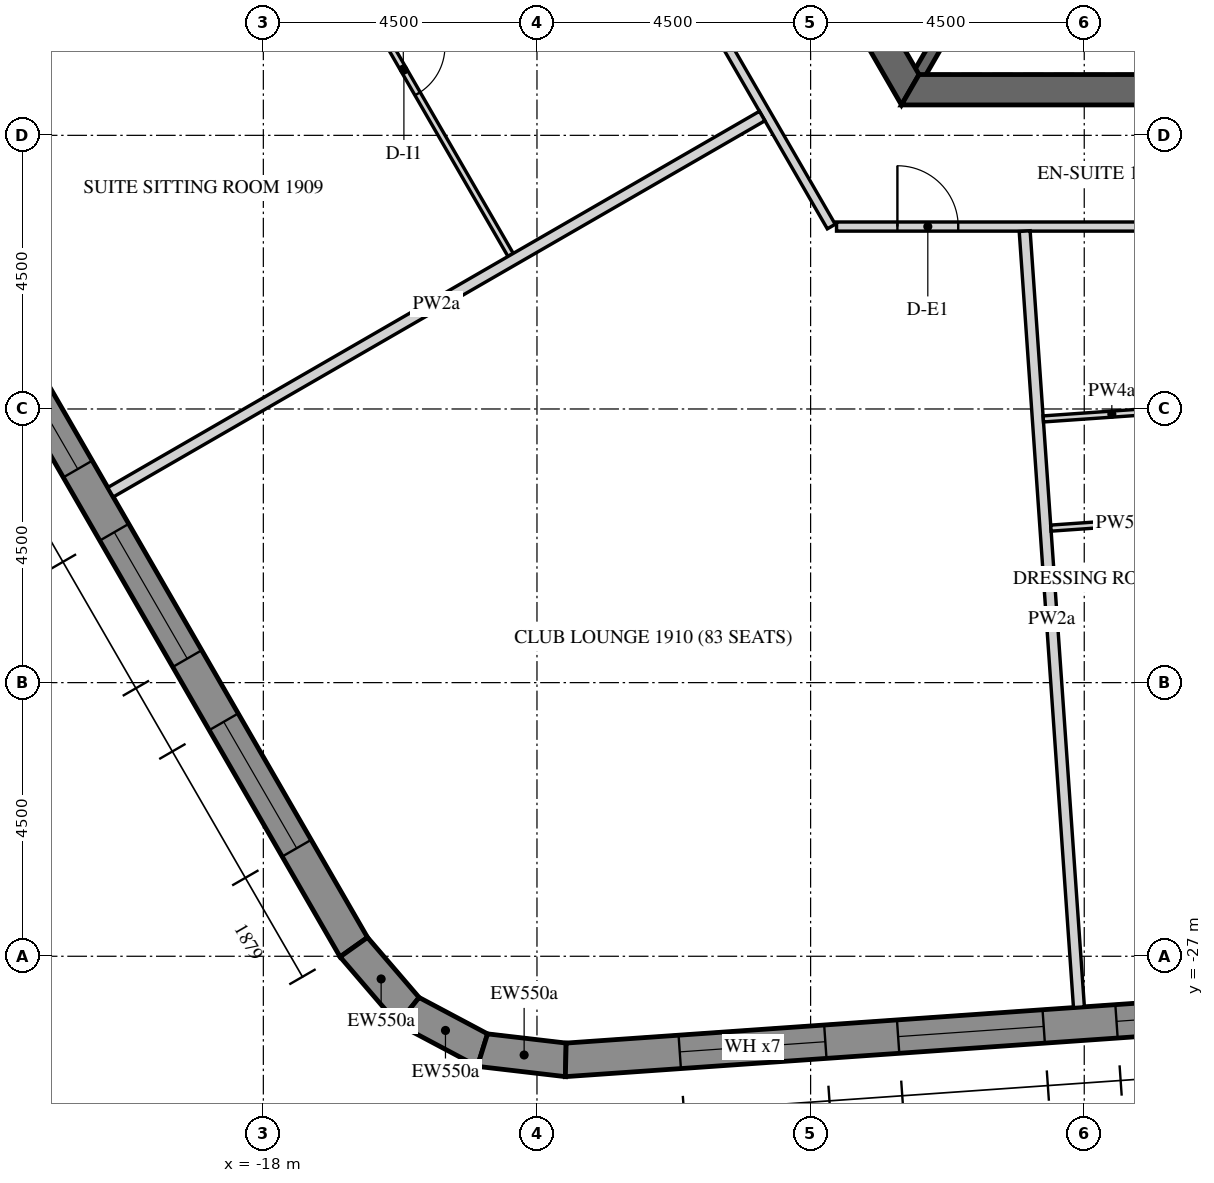
"""IFC4 building model, lengths in metres.
Left out: names, types, materials, properties, quantities, classifications, styles, units other than length and angle.
Written with IfcOpenShell. Run it as: python <this file> out.ifc"""

import sys

from ifc_helpers import new_model, si_unit, direction, frame, frame_2d, origin, place, context, subcontext, project, spatial, polyline, rectangle, outline, extrude, element, fill, save


model = new_model("IFC4")
c1 = context("Model", 3, precision=1e-05, world=origin(), true_north=direction((0.0, 1.0)))
c2 = subcontext(c1, "Body", "Model", "MODEL_VIEW")
j1 = project(units=[si_unit("LENGTHUNIT", "METRE"), si_unit("PLANEANGLEUNIT", "RADIAN")], contexts=[c1])
p1 = place(None, origin())
s1 = spatial("IfcSite", under=j1, at=p1, CompositionType="ELEMENT")
p2 = place(p1, origin())
s2 = spatial("IfcBuilding", under=s1, at=p2, CompositionType="ELEMENT")
p3 = place(p2, frame((0.0, 0.0, 246.3)))
s3 = spatial("IfcBuildingStorey", under=s2, at=p3, CompositionType="ELEMENT", Elevation=246.3)
p4 = place(p3, frame((-30.391, -2.811, -0.15), z_axis=(0.0, 0.0, 1.0), x_axis=(0.499998569178, -0.866026229868, 0.0)))
e1 = element("IfcWall", 1, at=p4, inside=s3, PredefinedType="SOLIDWALL", context=c2, shape_type="SweptSolid", body=[
    extrude(outline(polyline([(-0.022, -0.275), (27.783, -0.275), (27.732, 0.275), (0.022, 0.275), (-0.022, -0.275)])), origin(), (0.0, 0.0, 1.0), 3.75),
])
p5 = place(p4, frame((1.879, 0.0, 1.05)))
e2 = element("IfcOpeningElement", 2, at=p5, cuts=e1, PredefinedType="OPENING", context=c2, shape_type="SweptSolid", body=[
    extrude(rectangle(XDim=2.4, YDim=2.4, at=frame_2d((1.2, 1.2))), frame((0.0, 0.285, 0.0), z_axis=(0.0, -1.0, 0.0), x_axis=(1.0, 0.0, 0.0)), (0.0, 0.0, 1.0), 0.57),
])
p6 = place(p4, frame((5.479, 0.0, 1.05)))
e3 = element("IfcOpeningElement", 3, at=p6, cuts=e1, PredefinedType="OPENING", context=c2, shape_type="SweptSolid", body=[
    extrude(rectangle(XDim=2.4, YDim=2.4, at=frame_2d((1.2, 1.2))), frame((0.0, 0.285, 0.0), z_axis=(0.0, -1.0, 0.0), x_axis=(1.0, 0.0, 0.0)), (0.0, 0.0, 1.0), 0.57),
])
p7 = place(p4, frame((9.079, 0.0, 1.05)))
e4 = element("IfcOpeningElement", 4, at=p7, cuts=e1, PredefinedType="OPENING", context=c2, shape_type="SweptSolid", body=[
    extrude(rectangle(XDim=2.4, YDim=2.4, at=frame_2d((1.2, 1.2))), frame((0.0, 0.285, 0.0), z_axis=(0.0, -1.0, 0.0), x_axis=(1.0, 0.0, 0.0)), (0.0, 0.0, 1.0), 0.57),
])
p8 = place(p4, frame((12.679, 0.0, 1.05)))
e5 = element("IfcOpeningElement", 5, at=p8, cuts=e1, PredefinedType="OPENING", context=c2, shape_type="SweptSolid", body=[
    extrude(rectangle(XDim=2.4, YDim=2.4, at=frame_2d((1.2, 1.2))), frame((0.0, 0.285, 0.0), z_axis=(0.0, -1.0, 0.0), x_axis=(1.0, 0.0, 0.0)), (0.0, 0.0, 1.0), 0.57),
])
p9 = place(p4, frame((16.279, 0.0, 1.05)))
e6 = element("IfcOpeningElement", 6, at=p9, cuts=e1, PredefinedType="OPENING", context=c2, shape_type="SweptSolid", body=[
    extrude(rectangle(XDim=2.4, YDim=2.4, at=frame_2d((1.2, 1.2))), frame((0.0, 0.285, 0.0), z_axis=(0.0, -1.0, 0.0), x_axis=(1.0, 0.0, 0.0)), (0.0, 0.0, 1.0), 0.57),
])
p10 = place(p4, frame((19.879, 0.0, 1.05)))
e7 = element("IfcOpeningElement", 7, at=p10, cuts=e1, PredefinedType="OPENING", context=c2, shape_type="SweptSolid", body=[
    extrude(rectangle(XDim=2.4, YDim=2.4, at=frame_2d((1.2, 1.2))), frame((0.0, 0.285, 0.0), z_axis=(0.0, -1.0, 0.0), x_axis=(1.0, 0.0, 0.0)), (0.0, 0.0, 1.0), 0.57),
])
p11 = place(p4, frame((23.479, 0.0, 1.05)))
e8 = element("IfcOpeningElement", 8, at=p11, cuts=e1, PredefinedType="OPENING", context=c2, shape_type="SweptSolid", body=[
    extrude(rectangle(XDim=2.4, YDim=2.4, at=frame_2d((1.2, 1.2))), frame((0.0, 0.285, 0.0), z_axis=(0.0, -1.0, 0.0), x_axis=(1.0, 0.0, 0.0)), (0.0, 0.0, 1.0), 0.57),
])
p12 = place(p3, frame((-16.512, -26.85, -0.15), z_axis=(0.0, 0.0, 1.0), x_axis=(0.651621950847, -0.758543890078, 0.0)))
e9 = element("IfcWall", 9, at=p12, inside=s3, PredefinedType="SOLIDWALL", context=c2, shape_type="SweptSolid", body=[
    extrude(outline(polyline([(-0.026, -0.275), (1.431, -0.275), (1.327, 0.275), (0.026, 0.275), (-0.026, -0.275)])), origin(), (0.0, 0.0, 1.0), 3.75),
])
p13 = place(p3, frame((-15.614, -27.896, -0.15), z_axis=(0.0, 0.0, 1.0), x_axis=(0.882994189209, -0.469383917304, 0.0)))
e10 = element("IfcWall", 10, at=p13, inside=s3, PredefinedType="SOLIDWALL", context=c2, shape_type="SweptSolid", body=[
    extrude(outline(polyline([(-0.052, -0.275), (1.431, -0.275), (1.327, 0.275), (0.052, 0.275), (-0.052, -0.275)])), origin(), (0.0, 0.0, 1.0), 3.75),
])
p14 = place(p3, frame((-14.396, -28.543, -0.15), z_axis=(0.0, 0.0, 1.0), x_axis=(0.993232537394, -0.11614269956, 0.0)))
e11 = element("IfcWall", 11, at=p14, inside=s3, PredefinedType="SOLIDWALL", context=c2, shape_type="SweptSolid", body=[
    extrude(outline(polyline([(-0.052, -0.275), (1.405, -0.275), (1.353, 0.275), (0.052, 0.275), (-0.052, -0.275)])), origin(), (0.0, 0.0, 1.0), 3.75),
])
p15 = place(p3, frame((-13.026, -28.704, -0.15), z_axis=(0.0, 0.0, 1.0), x_axis=(0.99756406806, 0.069756219185, 0.0)))
e12 = element("IfcWall", 12, at=p15, inside=s3, PredefinedType="SOLIDWALL", context=c2, shape_type="SweptSolid", body=[
    extrude(outline(polyline([(-0.026, -0.275), (27.78, -0.275), (27.735, 0.275), (0.026, 0.275), (-0.026, -0.275)])), origin(), (0.0, 0.0, 1.0), 3.75),
])
p16 = place(p15, frame((1.879, 0.0, 1.05)))
e13 = element("IfcOpeningElement", 13, at=p16, cuts=e12, PredefinedType="OPENING", context=c2, shape_type="SweptSolid", body=[
    extrude(rectangle(XDim=2.4, YDim=2.4, at=frame_2d((1.2, 1.2))), frame((0.0, 0.285, 0.0), z_axis=(0.0, -1.0, 0.0), x_axis=(1.0, 0.0, 0.0)), (0.0, 0.0, 1.0), 0.57),
])
p17 = place(p15, frame((5.479, 0.0, 1.05)))
e14 = element("IfcOpeningElement", 14, at=p17, cuts=e12, PredefinedType="OPENING", context=c2, shape_type="SweptSolid", body=[
    extrude(rectangle(XDim=2.4, YDim=2.4, at=frame_2d((1.2, 1.2))), frame((0.0, 0.285, 0.0), z_axis=(0.0, -1.0, 0.0), x_axis=(1.0, 0.0, 0.0)), (0.0, 0.0, 1.0), 0.57),
])
p18 = place(p15, frame((9.079, 0.0, 1.05)))
e15 = element("IfcOpeningElement", 15, at=p18, cuts=e12, PredefinedType="OPENING", context=c2, shape_type="SweptSolid", body=[
    extrude(rectangle(XDim=2.4, YDim=2.4, at=frame_2d((1.2, 1.2))), frame((0.0, 0.285, 0.0), z_axis=(0.0, -1.0, 0.0), x_axis=(1.0, 0.0, 0.0)), (0.0, 0.0, 1.0), 0.57),
])
p19 = place(p15, frame((12.679, 0.0, 1.05)))
e16 = element("IfcOpeningElement", 16, at=p19, cuts=e12, PredefinedType="OPENING", context=c2, shape_type="SweptSolid", body=[
    extrude(rectangle(XDim=2.4, YDim=2.4, at=frame_2d((1.2, 1.2))), frame((0.0, 0.285, 0.0), z_axis=(0.0, -1.0, 0.0), x_axis=(1.0, 0.0, 0.0)), (0.0, 0.0, 1.0), 0.57),
])
p20 = place(p15, frame((16.279, 0.0, 1.05)))
e17 = element("IfcOpeningElement", 17, at=p20, cuts=e12, PredefinedType="OPENING", context=c2, shape_type="SweptSolid", body=[
    extrude(rectangle(XDim=2.4, YDim=2.4, at=frame_2d((1.2, 1.2))), frame((0.0, 0.285, 0.0), z_axis=(0.0, -1.0, 0.0), x_axis=(1.0, 0.0, 0.0)), (0.0, 0.0, 1.0), 0.57),
])
p21 = place(p15, frame((19.879, 0.0, 1.05)))
e18 = element("IfcOpeningElement", 18, at=p21, cuts=e12, PredefinedType="OPENING", context=c2, shape_type="SweptSolid", body=[
    extrude(rectangle(XDim=2.4, YDim=2.4, at=frame_2d((1.2, 1.2))), frame((0.0, 0.285, 0.0), z_axis=(0.0, -1.0, 0.0), x_axis=(1.0, 0.0, 0.0)), (0.0, 0.0, 1.0), 0.57),
])
p22 = place(p15, frame((23.479, 0.0, 1.05)))
e19 = element("IfcOpeningElement", 19, at=p22, cuts=e12, PredefinedType="OPENING", context=c2, shape_type="SweptSolid", body=[
    extrude(rectangle(XDim=2.4, YDim=2.4, at=frame_2d((1.2, 1.2))), frame((0.0, 0.285, 0.0), z_axis=(0.0, -1.0, 0.0), x_axis=(1.0, 0.0, 0.0)), (0.0, 0.0, 1.0), 0.57),
])
p23 = place(p3, frame((-14.722, 0.0, -0.15), z_axis=(0.0, 0.0, 1.0), x_axis=(0.50000571537, -0.866022103989, 0.0)))
e20 = element("IfcWall", 20, at=p23, inside=s3, PredefinedType="SHEAR", context=c2, shape_type="SweptSolid", body=[
    extrude(outline(polyline([(-0.144, -0.25), (14.867, -0.25), (14.578, 0.25), (0.144, 0.25), (-0.144, -0.25)])), origin(), (0.0, 0.0, 1.0), 3.75),
])
p24 = place(p23, frame((6.432, 0.0, 0.15)))
e21 = element("IfcOpeningElement", 21, at=p24, cuts=e20, PredefinedType="OPENING", context=c2, shape_type="SweptSolid", body=[
    extrude(rectangle(XDim=1.8, YDim=2.4, at=frame_2d((0.9, 1.2))), frame((0.0, 0.26, 0.0), z_axis=(0.0, -1.0, 0.0), x_axis=(1.0, 0.0, 0.0)), (0.0, 0.0, 1.0), 0.52),
])
p25 = place(p3, frame((-7.361, -12.75, -0.15), z_axis=(0.0, 0.0, 1.0), x_axis=(1.0, 0.0, 0.0)))
e22 = element("IfcWall", 22, at=p25, inside=s3, PredefinedType="SHEAR", context=c2, shape_type="SweptSolid", body=[
    extrude(outline(polyline([(-0.144, -0.25), (14.866, -0.25), (14.578, 0.25), (0.144, 0.25), (-0.144, -0.25)])), origin(), (0.0, 0.0, 1.0), 3.75),
])
p26 = place(p25, frame((6.761, 0.0, 0.15)))
e23 = element("IfcOpeningElement", 23, at=p26, cuts=e22, PredefinedType="OPENING", context=c2, shape_type="SweptSolid", body=[
    extrude(rectangle(XDim=1.2, YDim=2.4, at=frame_2d((0.6, 1.2))), frame((0.0, 0.26, 0.0), z_axis=(0.0, -1.0, 0.0), x_axis=(1.0, 0.0, 0.0)), (0.0, 0.0, 1.0), 0.52),
])
p27 = place(p3, frame((-5.773, -10.0, -0.15), z_axis=(0.0, 0.0, 1.0), x_axis=(-0.499995765644, -0.866027848477, 0.0)))
e24 = element("IfcWall", 24, at=p27, inside=s3, PredefinedType="SHEAR", context=c2, shape_type="SweptSolid", body=[
    extrude(rectangle(XDim=2.887, YDim=0.2, at=frame_2d((1.443, 0.0))), origin(), (0.0, 0.0, 1.0), 3.75),
])
p28 = place(p3, frame((-15.094, -3.856, 0.0), z_axis=(0.0, 0.0, 1.0), x_axis=(0.500006037985, -0.866021917724, 0.0)))
e25 = element("IfcWall", 25, at=p28, inside=s3, PredefinedType="PARTITIONING", context=c2, shape_type="SweptSolid", body=[
    extrude(rectangle(XDim=12.867, YDim=0.15, at=frame_2d((6.434, 0.0))), origin(), (0.0, 0.0, 1.0), 2.838),
])
p29 = place(p28, frame((6.125, 0.0, 0.0)))
e26 = element("IfcOpeningElement", 26, at=p29, cuts=e25, PredefinedType="OPENING", context=c2, shape_type="SweptSolid", body=[
    extrude(rectangle(XDim=1.0, YDim=2.1, at=frame_2d((0.5, 1.05))), frame((0.0, 0.085, 0.0), z_axis=(0.0, -1.0, 0.0), x_axis=(1.0, 0.0, 0.0)), (0.0, 0.0, 1.0), 0.17),
])
p30 = place(p3, frame((-8.574, -15.0, 0.0), z_axis=(0.0, 0.0, 1.0), x_axis=(1.0, 0.0, 0.0)))
e27 = element("IfcWall", 27, at=p30, inside=s3, PredefinedType="PARTITIONING", context=c2, shape_type="SweptSolid", body=[
    extrude(rectangle(XDim=13.915, YDim=0.15, at=frame_2d((6.958, 0.0))), origin(), (0.0, 0.0, 1.0), 2.838),
])
p31 = place(p30, frame((1.001, 0.0, 0.0)))
e28 = element("IfcOpeningElement", 28, at=p31, cuts=e27, PredefinedType="OPENING", context=c2, shape_type="SweptSolid", body=[
    extrude(rectangle(XDim=1.0, YDim=2.1, at=frame_2d((0.5, 1.05))), frame((0.0, 0.085, 0.0), z_axis=(0.0, -1.0, 0.0), x_axis=(1.0, 0.0, 0.0)), (0.0, 0.0, 1.0), 0.17),
])
p32 = place(p30, frame((9.199, 0.0, 0.0)))
e29 = element("IfcOpeningElement", 29, at=p32, cuts=e27, PredefinedType="OPENING", context=c2, shape_type="SweptSolid", body=[
    extrude(rectangle(XDim=1.0, YDim=2.1, at=frame_2d((0.5, 1.05))), frame((0.0, 0.085, 0.0), z_axis=(0.0, -1.0, 0.0), x_axis=(1.0, 0.0, 0.0)), (0.0, 0.0, 1.0), 0.17),
])
p33 = place(p3, frame((-24.114, -13.134, 0.0), z_axis=(0.0, 0.0, 1.0), x_axis=(0.866033062874, 0.499986733834, 0.0)))
e30 = element("IfcWall", 30, at=p33, inside=s3, PredefinedType="PARTITIONING", context=c2, shape_type="SweptSolid", body=[
    extrude(rectangle(XDim=7.65, YDim=0.1, at=frame_2d((3.825, 0.0))), origin(), (0.0, 0.0, 1.0), 2.838),
])
p34 = place(p3, frame((-17.463, -9.353, 0.0), z_axis=(0.0, 0.0, 1.0), x_axis=(0.499995846692, -0.866027801685, 0.0)))
e31 = element("IfcWall", 31, at=p34, inside=s3, PredefinedType="PARTITIONING", context=c2, shape_type="SweptSolid", body=[
    extrude(rectangle(XDim=7.06, YDim=0.1, at=frame_2d((3.53, 0.0))), origin(), (0.0, 0.0, 1.0), 2.838),
])
p35 = place(p34, frame((3.1, 0.0, 0.0)))
e32 = element("IfcOpeningElement", 32, at=p35, cuts=e31, PredefinedType="OPENING", context=c2, shape_type="SweptSolid", body=[
    extrude(rectangle(XDim=0.9, YDim=2.1, at=frame_2d((0.45, 1.05))), frame((0.0, 0.06, 0.0), z_axis=(0.0, -1.0, 0.0), x_axis=(1.0, 0.0, 0.0)), (0.0, 0.0, 1.0), 0.12),
])
p36 = place(p3, frame((-20.513, -19.37, 0.0), z_axis=(0.0, 0.0, 1.0), x_axis=(0.866024931941, 0.500000817256, 0.0)))
e33 = element("IfcWall", 33, at=p36, inside=s3, PredefinedType="PARTITIONING", context=c2, shape_type="SweptSolid", body=[
    extrude(rectangle(XDim=12.375, YDim=0.18, at=frame_2d((6.188, 0.0))), origin(), (0.0, 0.0, 1.0), 2.838),
])
p37 = place(p3, frame((-4.587, -27.838, 0.0), z_axis=(0.0, 0.0, 1.0), x_axis=(-0.069764754112, 0.997563471206, 0.0)))
e34 = element("IfcWall", 34, at=p37, inside=s3, PredefinedType="PARTITIONING", context=c2, shape_type="SweptSolid", body=[
    extrude(rectangle(XDim=12.794, YDim=0.18, at=frame_2d((6.397, 0.0))), origin(), (0.0, 0.0, 1.0), 2.838),
])
for number, where, z_axis, x_axis in (
    (35, (-2.793, -19.802, 0.0), (0.0, 0.0, 1.0), (-0.998, -0.07, 0.0)),
    (36, (-5.174, -18.164, 0.0), (0.0, 0.0, 1.0), (0.998, 0.07, 0.0)),
):
    element("IfcWall", number, at=place(p3, frame(where, z_axis=z_axis, x_axis=x_axis)), inside=s3, PredefinedType="PARTITIONING", context=c2, shape_type="SweptSolid", body=[
        extrude(rectangle(XDim=2.26, YDim=0.1, at=frame_2d((1.13, 0.0))), origin(), (0.0, 0.0, 1.0), 2.838),
    ])
p38 = place(p9, frame((0.0, 0.205, 0.0)))
e37 = element("IfcWindow", 37, at=p38, inside=s3, PartitioningType="DOUBLE_PANEL_VERTICAL", PredefinedType="WINDOW", context=c2, shape_type="SweptSolid", body=[
    extrude(rectangle(XDim=2.4, YDim=2.4, at=frame_2d((1.2, 1.2))), frame((0.0, 0.03, 0.0), z_axis=(0.0, -1.0, 0.0), x_axis=(1.0, 0.0, 0.0)), (0.0, 0.0, 1.0), 0.06),
])
fill(e6, e37)
p39 = place(p10, frame((0.0, 0.205, 0.0)))
e38 = element("IfcWindow", 38, at=p39, inside=s3, PartitioningType="DOUBLE_PANEL_VERTICAL", PredefinedType="WINDOW", context=c2, shape_type="SweptSolid", body=[
    extrude(rectangle(XDim=2.4, YDim=2.4, at=frame_2d((1.2, 1.2))), frame((0.0, 0.03, 0.0), z_axis=(0.0, -1.0, 0.0), x_axis=(1.0, 0.0, 0.0)), (0.0, 0.0, 1.0), 0.06),
])
fill(e7, e38)
p40 = place(p11, frame((0.0, 0.205, 0.0)))
e39 = element("IfcWindow", 39, at=p40, inside=s3, PartitioningType="DOUBLE_PANEL_VERTICAL", PredefinedType="WINDOW", context=c2, shape_type="SweptSolid", body=[
    extrude(rectangle(XDim=2.4, YDim=2.4, at=frame_2d((1.2, 1.2))), frame((0.0, 0.03, 0.0), z_axis=(0.0, -1.0, 0.0), x_axis=(1.0, 0.0, 0.0)), (0.0, 0.0, 1.0), 0.06),
])
fill(e8, e39)
p41 = place(p16, frame((0.0, 0.205, 0.0)))
e40 = element("IfcWindow", 40, at=p41, inside=s3, PartitioningType="DOUBLE_PANEL_VERTICAL", PredefinedType="WINDOW", context=c2, shape_type="SweptSolid", body=[
    extrude(rectangle(XDim=2.4, YDim=2.4, at=frame_2d((1.2, 1.2))), frame((0.0, 0.03, 0.0), z_axis=(0.0, -1.0, 0.0), x_axis=(1.0, 0.0, 0.0)), (0.0, 0.0, 1.0), 0.06),
])
fill(e13, e40)
p42 = place(p17, frame((0.0, 0.205, 0.0)))
e41 = element("IfcWindow", 41, at=p42, inside=s3, PartitioningType="DOUBLE_PANEL_VERTICAL", PredefinedType="WINDOW", context=c2, shape_type="SweptSolid", body=[
    extrude(rectangle(XDim=2.4, YDim=2.4, at=frame_2d((1.2, 1.2))), frame((0.0, 0.03, 0.0), z_axis=(0.0, -1.0, 0.0), x_axis=(1.0, 0.0, 0.0)), (0.0, 0.0, 1.0), 0.06),
])
fill(e14, e41)
p43 = place(p18, frame((0.0, 0.205, 0.0)))
e42 = element("IfcWindow", 42, at=p43, inside=s3, PartitioningType="DOUBLE_PANEL_VERTICAL", PredefinedType="WINDOW", context=c2, shape_type="SweptSolid", body=[
    extrude(rectangle(XDim=2.4, YDim=2.4, at=frame_2d((1.2, 1.2))), frame((0.0, 0.03, 0.0), z_axis=(0.0, -1.0, 0.0), x_axis=(1.0, 0.0, 0.0)), (0.0, 0.0, 1.0), 0.06),
])
fill(e15, e42)
p44 = place(p35, origin())
e43 = element("IfcDoor", 43, at=p44, inside=s3, OperationType="SINGLE_SWING_RIGHT", PredefinedType="DOOR", context=c2, shape_type="SweptSolid", body=[
    extrude(rectangle(XDim=0.9, YDim=2.1, at=frame_2d((0.45, 1.05))), frame((0.0, 0.025, 0.0), z_axis=(0.0, -1.0, 0.0), x_axis=(1.0, 0.0, 0.0)), (0.0, 0.0, 1.0), 0.05),
])
fill(e32, e43)
p45 = place(p31, origin())
e44 = element("IfcDoor", 44, at=p45, inside=s3, OperationType="SINGLE_SWING_RIGHT", PredefinedType="DOOR", context=c2, shape_type="SweptSolid", body=[
    extrude(rectangle(XDim=1.0, YDim=2.1, at=frame_2d((0.5, 1.05))), frame((0.0, 0.025, 0.0), z_axis=(0.0, -1.0, 0.0), x_axis=(1.0, 0.0, 0.0)), (0.0, 0.0, 1.0), 0.05),
])
fill(e28, e44)
save(model, sys.argv[1])
